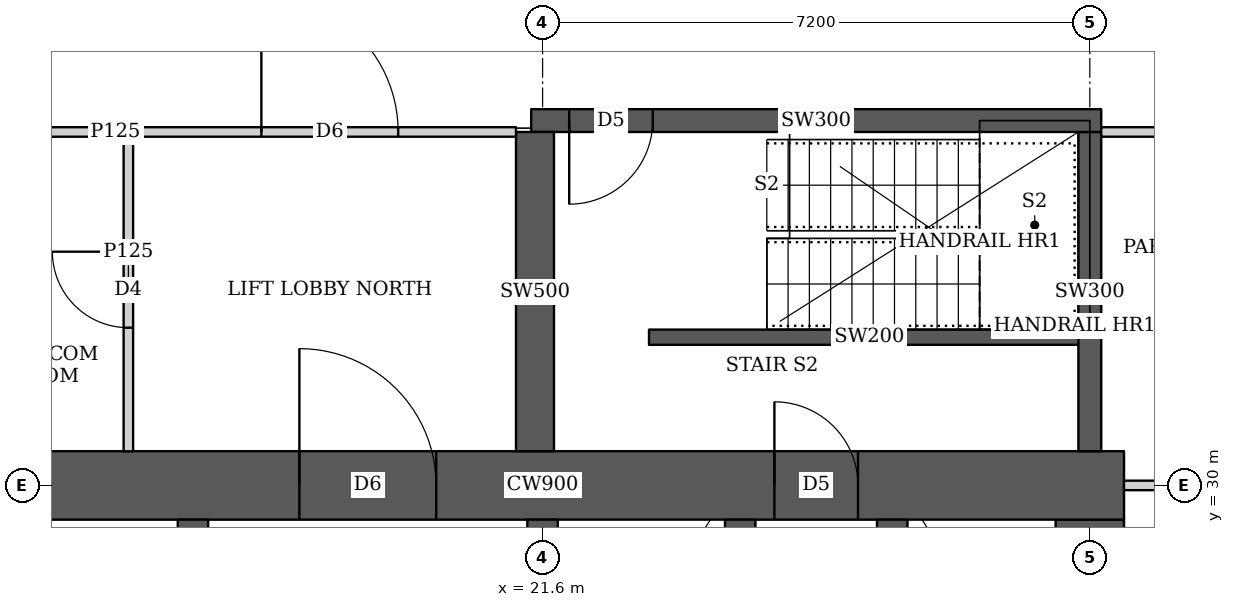
"""IFC4 building model, lengths in metres.
Left out: names, types, materials, properties, quantities, classifications, styles, units other than length and angle.
Written with IfcOpenShell. Run it as: python <this file> out.ifc"""

import sys

from ifc_helpers import new_model, si_unit, direction, frame, frame_2d, origin, place, context, subcontext, project, spatial, rectangle, extrude, element, fill, save


model = new_model("IFC4")
c1 = context("Model", 3, precision=1e-05, world=origin(), true_north=direction((0.0, 1.0)))
c2 = subcontext(c1, "Body", "Model", "MODEL_VIEW")
j1 = project(units=[si_unit("LENGTHUNIT", "METRE"), si_unit("PLANEANGLEUNIT", "RADIAN")], contexts=[c1])
p1 = place(None, origin())
s1 = spatial("IfcSite", under=j1, at=p1, CompositionType="ELEMENT")
p2 = place(p1, origin())
s2 = spatial("IfcBuilding", under=s1, at=p2, CompositionType="ELEMENT")
p3 = place(p2, frame((0.0, 0.0, 212.45)))
s3 = spatial("IfcBuildingStorey", under=s2, at=p3, CompositionType="ELEMENT", Elevation=212.45)
p4 = place(p3, frame((13.95, 30.0, 0.0), z_axis=(0.0, 0.0, 1.0), x_axis=(1.0, 0.0, 0.0)))
e1 = element("IfcWall", 1, at=p4, inside=s3, PredefinedType="SHEAR", context=c2, shape_type="SweptSolid", body=[
    extrude(rectangle(XDim=15.3, YDim=0.9, at=frame_2d((7.65, 0.0))), origin(), (0.0, 0.0, 1.0), 3.75),
])
p5 = place(p4, frame((4.45, 0.0, 0.0)))
e2 = element("IfcOpeningElement", 2, at=p5, cuts=e1, PredefinedType="OPENING", context=c2, shape_type="SweptSolid", body=[
    extrude(rectangle(XDim=1.8, YDim=2.1, at=frame_2d((0.9, 1.05))), frame((0.0, 0.46, 0.0), z_axis=(0.0, -1.0, 0.0), x_axis=(1.0, 0.0, 0.0)), (0.0, 0.0, 1.0), 0.92),
])
p6 = place(p4, frame((10.7, 0.0, 0.0)))
e3 = element("IfcOpeningElement", 3, at=p6, cuts=e1, PredefinedType="OPENING", context=c2, shape_type="SweptSolid", body=[
    extrude(rectangle(XDim=1.1, YDim=2.1, at=frame_2d((0.55, 1.05))), frame((0.0, 0.46, 0.0), z_axis=(0.0, -1.0, 0.0), x_axis=(1.0, 0.0, 0.0)), (0.0, 0.0, 1.0), 0.92),
])
p7 = place(p3, frame((28.8, 15.45, 0.0), z_axis=(0.0, 0.0, 1.0), x_axis=(0.0, 1.0, 0.0)))
e4 = element("IfcWall", 4, at=p7, inside=s3, PredefinedType="SHEAR", context=c2, shape_type="SweptSolid", body=[
    extrude(rectangle(XDim=14.1, YDim=0.9, at=frame_2d((7.05, 0.0))), origin(), (0.0, 0.0, 1.0), 3.75),
])
p8 = place(p3, frame((17.0, 15.45, 0.0), z_axis=(0.0, 0.0, 1.0), x_axis=(0.0, 1.0, 0.0)))
e5 = element("IfcWall", 5, at=p8, inside=s3, PredefinedType="SHEAR", context=c2, shape_type="SweptSolid", body=[
    extrude(rectangle(XDim=14.1, YDim=0.4, at=frame_2d((7.05, 0.0))), origin(), (0.0, 0.0, 1.0), 3.75),
])
p9 = place(p8, frame((0.925, 0.0, 0.0)))
e6 = element("IfcOpeningElement", 6, at=p9, cuts=e5, PredefinedType="OPENING", context=c2, shape_type="SweptSolid", body=[
    extrude(rectangle(XDim=1.0, YDim=2.1, at=frame_2d((0.5, 1.05))), frame((0.0, 0.21, 0.0), z_axis=(0.0, -1.0, 0.0), x_axis=(1.0, 0.0, 0.0)), (0.0, 0.0, 1.0), 0.42),
])
p10 = place(p8, frame((4.675, 0.0, 0.0)))
e7 = element("IfcOpeningElement", 7, at=p10, cuts=e5, PredefinedType="OPENING", context=c2, shape_type="SweptSolid", body=[
    extrude(rectangle(XDim=1.0, YDim=2.1, at=frame_2d((0.5, 1.05))), frame((0.0, 0.21, 0.0), z_axis=(0.0, -1.0, 0.0), x_axis=(1.0, 0.0, 0.0)), (0.0, 0.0, 1.0), 0.42),
])
p11 = place(p8, frame((8.425, 0.0, 0.0)))
e8 = element("IfcOpeningElement", 8, at=p11, cuts=e5, PredefinedType="OPENING", context=c2, shape_type="SweptSolid", body=[
    extrude(rectangle(XDim=1.0, YDim=2.1, at=frame_2d((0.5, 1.05))), frame((0.0, 0.21, 0.0), z_axis=(0.0, -1.0, 0.0), x_axis=(1.0, 0.0, 0.0)), (0.0, 0.0, 1.0), 0.42),
])
p12 = place(p8, frame((12.175, 0.0, 0.0)))
e9 = element("IfcOpeningElement", 9, at=p12, cuts=e5, PredefinedType="OPENING", context=c2, shape_type="SweptSolid", body=[
    extrude(rectangle(XDim=1.0, YDim=2.1, at=frame_2d((0.5, 1.05))), frame((0.0, 0.21, 0.0), z_axis=(0.0, -1.0, 0.0), x_axis=(1.0, 0.0, 0.0)), (0.0, 0.0, 1.0), 0.42),
])
p13 = place(p3, frame((21.6, 15.45, 0.0), z_axis=(0.0, 0.0, 1.0), x_axis=(0.0, 1.0, 0.0)))
e10 = element("IfcWall", 10, at=p13, inside=s3, PredefinedType="SHEAR", context=c2, shape_type="SweptSolid", body=[
    extrude(rectangle(XDim=14.1, YDim=0.4, at=frame_2d((7.05, 0.0))), origin(), (0.0, 0.0, 1.0), 3.75),
])
p14 = place(p13, frame((0.875, 0.0, 0.0)))
e11 = element("IfcOpeningElement", 11, at=p14, cuts=e10, PredefinedType="OPENING", context=c2, shape_type="SweptSolid", body=[
    extrude(rectangle(XDim=1.1, YDim=2.1, at=frame_2d((0.55, 1.05))), frame((0.0, 0.21, 0.0), z_axis=(0.0, -1.0, 0.0), x_axis=(1.0, 0.0, 0.0)), (0.0, 0.0, 1.0), 0.42),
])
p15 = place(p13, frame((4.625, 0.0, 0.0)))
e12 = element("IfcOpeningElement", 12, at=p15, cuts=e10, PredefinedType="OPENING", context=c2, shape_type="SweptSolid", body=[
    extrude(rectangle(XDim=1.1, YDim=2.1, at=frame_2d((0.55, 1.05))), frame((0.0, 0.21, 0.0), z_axis=(0.0, -1.0, 0.0), x_axis=(1.0, 0.0, 0.0)), (0.0, 0.0, 1.0), 0.42),
])
p16 = place(p13, frame((8.375, 0.0, 0.0)))
e13 = element("IfcOpeningElement", 13, at=p16, cuts=e10, PredefinedType="OPENING", context=c2, shape_type="SweptSolid", body=[
    extrude(rectangle(XDim=1.1, YDim=2.1, at=frame_2d((0.55, 1.05))), frame((0.0, 0.21, 0.0), z_axis=(0.0, -1.0, 0.0), x_axis=(1.0, 0.0, 0.0)), (0.0, 0.0, 1.0), 0.42),
])
p17 = place(p13, frame((12.125, 0.0, 0.0)))
e14 = element("IfcOpeningElement", 14, at=p17, cuts=e10, PredefinedType="OPENING", context=c2, shape_type="SweptSolid", body=[
    extrude(rectangle(XDim=1.1, YDim=2.1, at=frame_2d((0.55, 1.05))), frame((0.0, 0.21, 0.0), z_axis=(0.0, -1.0, 0.0), x_axis=(1.0, 0.0, 0.0)), (0.0, 0.0, 1.0), 0.42),
])
p18 = place(p3, frame((24.2, 15.45, 0.0), z_axis=(0.0, 0.0, 1.0), x_axis=(0.0, 1.0, 0.0)))
e15 = element("IfcWall", 15, at=p18, inside=s3, PredefinedType="SHEAR", context=c2, shape_type="SweptSolid", body=[
    extrude(rectangle(XDim=14.1, YDim=0.4, at=frame_2d((7.05, 0.0))), origin(), (0.0, 0.0, 1.0), 3.75),
])
p19 = place(p3, frame((26.2, 26.45, 0.0), z_axis=(0.0, 0.0, 1.0), x_axis=(0.0, 1.0, 0.0)))
e16 = element("IfcWall", 16, at=p19, inside=s3, PredefinedType="SHEAR", context=c2, shape_type="SweptSolid", body=[
    extrude(rectangle(XDim=3.1, YDim=0.4, at=frame_2d((1.55, 0.0))), origin(), (0.0, 0.0, 1.0), 3.75),
])
p20 = place(p19, frame((1.075, 0.0, 0.0)))
e17 = element("IfcOpeningElement", 17, at=p20, cuts=e16, PredefinedType="OPENING", context=c2, shape_type="SweptSolid", body=[
    extrude(rectangle(XDim=1.2, YDim=2.1, at=frame_2d((0.6, 1.05))), frame((0.0, 0.21, 0.0), z_axis=(0.0, -1.0, 0.0), x_axis=(1.0, 0.0, 0.0)), (0.0, 0.0, 1.0), 0.42),
])
p21 = place(p3, frame((21.45, 34.8, 0.0), z_axis=(0.0, 0.0, 1.0), x_axis=(1.0, 0.0, 0.0)))
e18 = element("IfcWall", 18, at=p21, inside=s3, PredefinedType="SHEAR", context=c2, shape_type="SweptSolid", body=[
    extrude(rectangle(XDim=7.5, YDim=0.3, at=frame_2d((3.75, 0.0))), origin(), (0.0, 0.0, 1.0), 3.75),
])
p22 = place(p21, frame((0.5, 0.0, 0.0)))
e19 = element("IfcOpeningElement", 19, at=p22, cuts=e18, PredefinedType="OPENING", context=c2, shape_type="SweptSolid", body=[
    extrude(rectangle(XDim=1.1, YDim=2.1, at=frame_2d((0.55, 1.05))), frame((0.0, 0.16, 0.0), z_axis=(0.0, -1.0, 0.0), x_axis=(1.0, 0.0, 0.0)), (0.0, 0.0, 1.0), 0.32),
])
p23 = place(p3, frame((21.5, 30.45, 0.0), z_axis=(0.0, 0.0, 1.0), x_axis=(0.0, 1.0, 0.0)))
e20 = element("IfcWall", 20, at=p23, inside=s3, PredefinedType="SHEAR", context=c2, shape_type="SweptSolid", body=[
    extrude(rectangle(XDim=4.2, YDim=0.5, at=frame_2d((2.1, 0.0))), origin(), (0.0, 0.0, 1.0), 3.75),
])
p24 = place(p3, frame((28.8, 30.45, 0.0), z_axis=(0.0, 0.0, 1.0), x_axis=(0.0, 1.0, 0.0)))
e21 = element("IfcWall", 21, at=p24, inside=s3, PredefinedType="SHEAR", context=c2, shape_type="SweptSolid", body=[
    extrude(rectangle(XDim=4.2, YDim=0.3, at=frame_2d((2.1, 0.0))), origin(), (0.0, 0.0, 1.0), 3.75),
])
p25 = place(p3, frame((10.713, 34.65, 0.0), z_axis=(0.0, 0.0, 1.0), x_axis=(1.0, 0.0, 0.0)))
e22 = element("IfcWall", 22, at=p25, inside=s3, PredefinedType="PARTITIONING", context=c2, shape_type="SweptSolid", body=[
    extrude(rectangle(XDim=10.537, YDim=0.125, at=frame_2d((5.269, 0.0))), origin(), (0.0, 0.0, 1.0), 3.5),
])
p26 = place(p25, frame((7.187, 0.0, 0.0)))
e23 = element("IfcOpeningElement", 23, at=p26, cuts=e22, PredefinedType="OPENING", context=c2, shape_type="SweptSolid", body=[
    extrude(rectangle(XDim=1.8, YDim=2.1, at=frame_2d((0.9, 1.05))), frame((0.0, 0.073, 0.0), z_axis=(0.0, -1.0, 0.0), x_axis=(1.0, 0.0, 0.0)), (0.0, 0.0, 1.0), 0.145),
])
p27 = place(p3, frame((16.15, 30.45, 0.0), z_axis=(0.0, 0.0, 1.0), x_axis=(0.0, 1.0, 0.0)))
e24 = element("IfcWall", 24, at=p27, inside=s3, PredefinedType="PARTITIONING", context=c2, shape_type="SweptSolid", body=[
    extrude(rectangle(XDim=4.137, YDim=0.125, at=frame_2d((2.068, 0.0))), origin(), (0.0, 0.0, 1.0), 3.5),
])
p28 = place(p27, frame((1.625, 0.0, 0.0)))
e25 = element("IfcOpeningElement", 25, at=p28, cuts=e24, PredefinedType="OPENING", context=c2, shape_type="SweptSolid", body=[
    extrude(rectangle(XDim=1.0, YDim=2.1, at=frame_2d((0.5, 1.05))), frame((0.0, 0.073, 0.0), z_axis=(0.0, -1.0, 0.0), x_axis=(1.0, 0.0, 0.0)), (0.0, 0.0, 1.0), 0.145),
])
p29 = place(p3, frame((28.95, 34.65, 0.0), z_axis=(0.0, 0.0, 1.0), x_axis=(1.0, 0.0, 0.0)))
e26 = element("IfcWall", 26, at=p29, inside=s3, PredefinedType="PARTITIONING", context=c2, shape_type="SweptSolid", body=[
    extrude(rectangle(XDim=4.381, YDim=0.125, at=frame_2d((2.19, 0.0))), origin(), (0.0, 0.0, 1.0), 3.5),
])
p30 = place(p3, frame((29.25, 30.0, 0.0), z_axis=(0.0, 0.0, 1.0), x_axis=(1.0, 0.0, 0.0)))
e27 = element("IfcWall", 27, at=p30, inside=s3, PredefinedType="PARTITIONING", context=c2, shape_type="SweptSolid", body=[
    extrude(rectangle(XDim=3.049, YDim=0.125, at=frame_2d((1.524, 0.0))), origin(), (0.0, 0.0, 1.0), 3.5),
])
p31 = place(p3, frame((23.0, 31.95, 0.0), z_axis=(0.0, 0.0, 1.0), x_axis=(1.0, 0.0, 0.0)))
e28 = element("IfcWall", 28, at=p31, inside=s3, PredefinedType="SHEAR", context=c2, shape_type="SweptSolid", body=[
    extrude(rectangle(XDim=5.8, YDim=0.2, at=frame_2d((2.9, 0.0))), origin(), (0.0, 0.0, 1.0), 3.75),
])
p32 = place(p28, origin())
e29 = element("IfcDoor", 29, at=p32, inside=s3, OperationType="SINGLE_SWING_RIGHT", PredefinedType="DOOR", context=c2, shape_type="SweptSolid", body=[
    extrude(rectangle(XDim=1.0, YDim=2.1, at=frame_2d((0.5, 1.05))), frame((0.0, 0.025, 0.0), z_axis=(0.0, -1.0, 0.0), x_axis=(1.0, 0.0, 0.0)), (0.0, 0.0, 1.0), 0.05),
])
fill(e25, e29)
p33 = place(p26, origin())
e30 = element("IfcDoor", 30, at=p33, inside=s3, OperationType="DOUBLE_DOOR_SINGLE_SWING", PredefinedType="DOOR", context=c2, shape_type="SweptSolid", body=[
    extrude(rectangle(XDim=1.8, YDim=2.1, at=frame_2d((0.9, 1.05))), frame((0.0, 0.025, 0.0), z_axis=(0.0, -1.0, 0.0), x_axis=(1.0, 0.0, 0.0)), (0.0, 0.0, 1.0), 0.05),
])
fill(e23, e30)
p34 = place(p5, origin())
e31 = element("IfcDoor", 31, at=p34, inside=s3, OperationType="DOUBLE_DOOR_SINGLE_SWING", PredefinedType="DOOR", context=c2, shape_type="SweptSolid", body=[
    extrude(rectangle(XDim=1.8, YDim=2.1, at=frame_2d((0.9, 1.05))), frame((0.0, 0.025, 0.0), z_axis=(0.0, -1.0, 0.0), x_axis=(1.0, 0.0, 0.0)), (0.0, 0.0, 1.0), 0.05),
])
fill(e2, e31)
p35 = place(p6, origin())
e32 = element("IfcDoor", 32, at=p35, inside=s3, OperationType="SINGLE_SWING_LEFT", PredefinedType="DOOR", context=c2, shape_type="SweptSolid", body=[
    extrude(rectangle(XDim=1.1, YDim=2.1, at=frame_2d((0.55, 1.05))), frame((0.0, 0.025, 0.0), z_axis=(0.0, -1.0, 0.0), x_axis=(1.0, 0.0, 0.0)), (0.0, 0.0, 1.0), 0.05),
])
fill(e3, e32)
p36 = place(p22, origin())
e33 = element("IfcDoor", 33, at=p36, inside=s3, OperationType="SINGLE_SWING_RIGHT", PredefinedType="DOOR", context=c2, shape_type="SweptSolid", body=[
    extrude(rectangle(XDim=1.1, YDim=2.1, at=frame_2d((0.55, 1.05))), frame((0.0, 0.025, 0.0), z_axis=(0.0, -1.0, 0.0), x_axis=(1.0, 0.0, 0.0)), (0.0, 0.0, 1.0), 0.05),
])
fill(e19, e33)
save(model, sys.argv[1])
